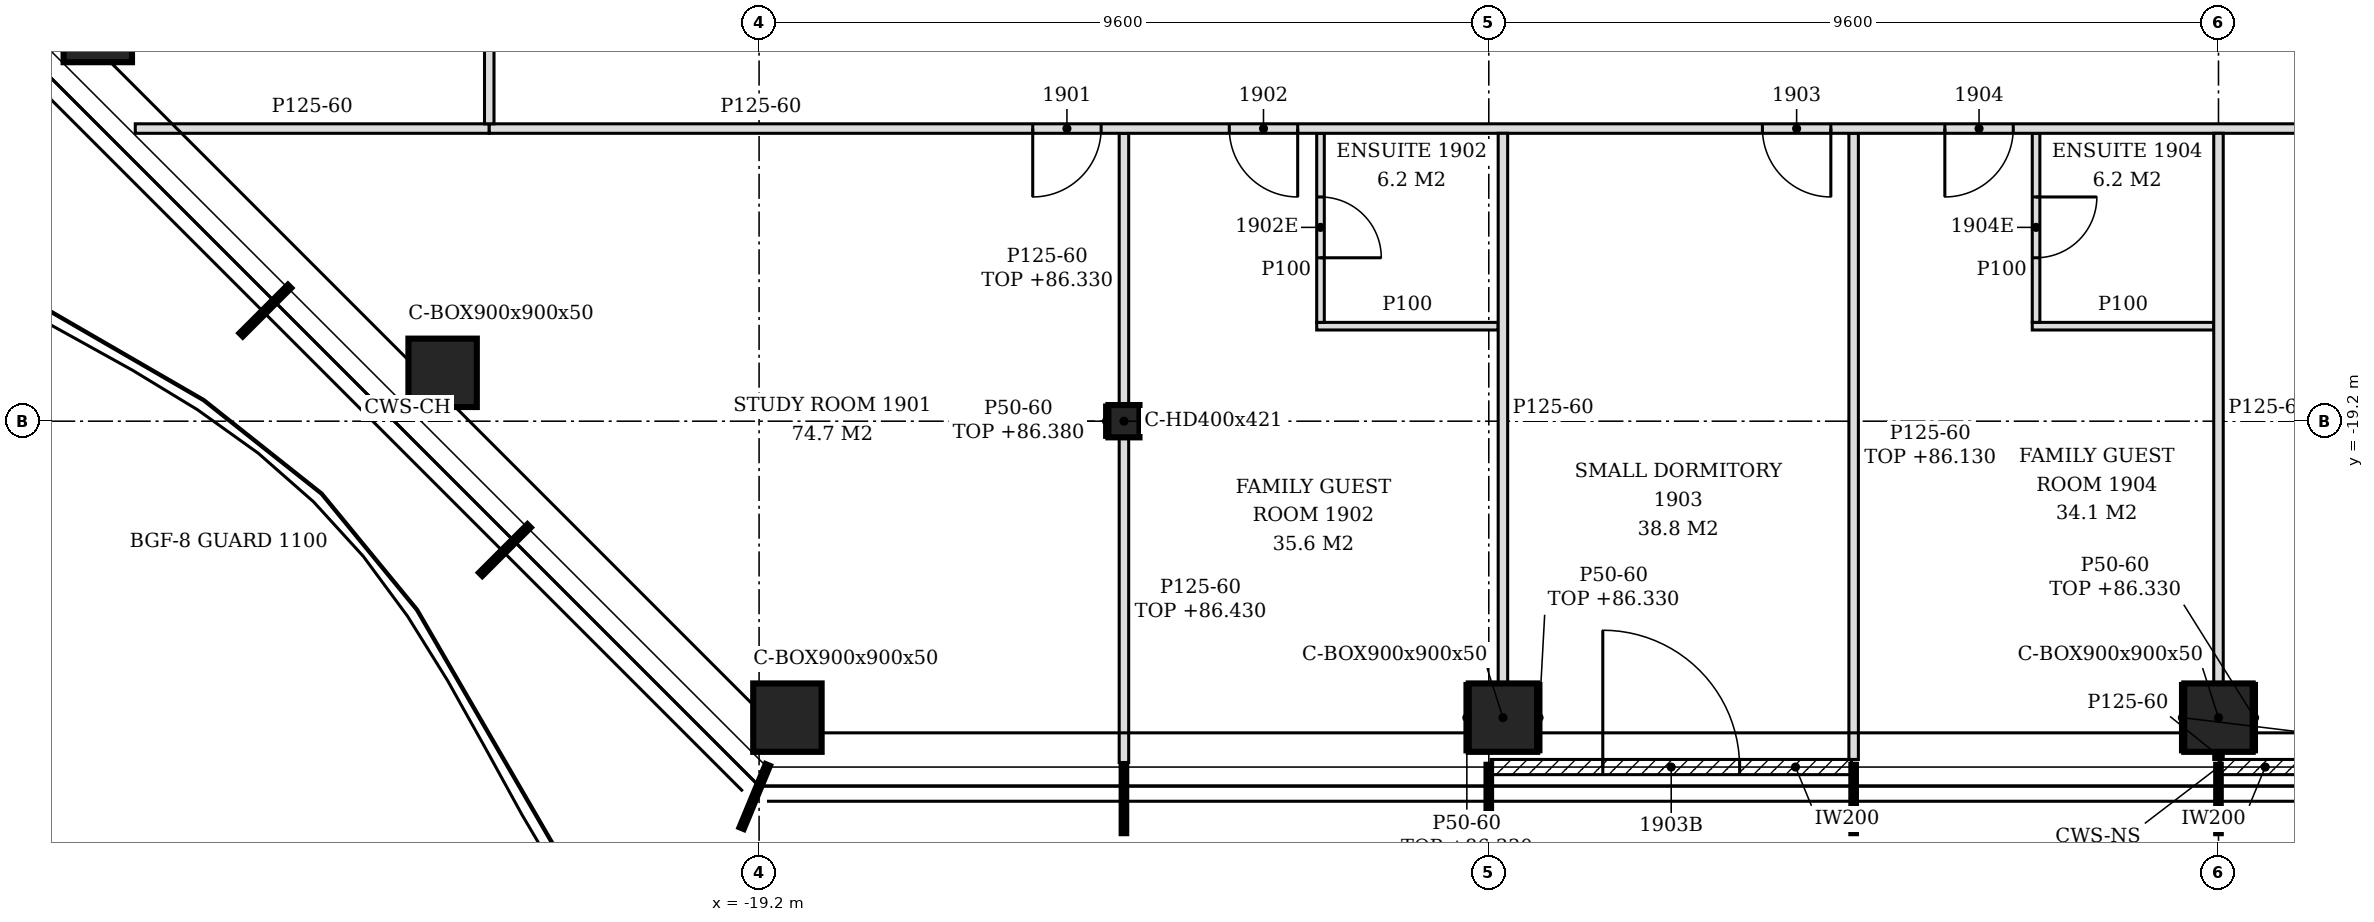
"""IFC4 building model, lengths in metres.
Left out: names, types, materials, properties, quantities, classifications, styles, units other than length and angle.
Written with IfcOpenShell. Run it as: python <this file> out.ifc"""

import sys

from ifc_helpers import new_model, si_unit, direction, frame, frame_2d, origin, origin_2d, place, context, subcontext, project, spatial, polyline, rectangle, hollow_rectangle, i_section, outline, extrude, clip, halfspace, element, fill, save


model = new_model("IFC4")
c1 = context("Model", 3, precision=1e-05, world=origin(), true_north=direction((0.0, 1.0)))
c2 = subcontext(c1, "Body", "Model", "MODEL_VIEW")
j1 = project(units=[si_unit("LENGTHUNIT", "METRE"), si_unit("PLANEANGLEUNIT", "RADIAN")], contexts=[c1])
p1 = place(None, origin())
s1 = spatial("IfcSite", under=j1, at=p1, CompositionType="ELEMENT")
p2 = place(p1, origin())
s2 = spatial("IfcBuilding", under=s1, at=p2, CompositionType="ELEMENT")
p3 = place(p2, frame((0.0, 0.0, 83.4)))
s3 = spatial("IfcBuildingStorey", under=s2, at=p3, CompositionType="ELEMENT", Elevation=83.4)
for number, where, z_axis, x_axis in (
    (1, (-18.827, -23.1, -0.15), (0.0, 0.0, 1.0), (1.0, 0.0, 0.0)),
    (2, (-9.414, -23.1, -0.15), (0.0, 0.0, 1.0), (1.0, 0.0, 0.0)),
    (3, (0.0, -23.1, -0.15), (0.0, 0.0, 1.0), (1.0, 0.0, 0.0)),
    (4, (-27.9, -14.027, -0.15), (0.0, 0.0, 1.0), (1.0, 0.0, 0.0)),
    (5, (-23.364, -18.564, -0.15), (0.0, 0.0, 1.0), (1.0, 0.0, 0.0)),
):
    element("IfcColumn", number, at=place(p3, frame(where, z_axis=z_axis, x_axis=x_axis)), inside=s3, PredefinedType="COLUMN", context=c2, shape_type="Clipping", body=[
        clip(extrude(hollow_rectangle(XDim=0.9, YDim=0.9, WallThickness=0.05, at=origin_2d()), origin(), (0.0, 0.0, 1.0), 3.6), halfspace(frame((0.0, 0.0, 3.576), z_axis=(0.0, 0.0, 1.0), x_axis=(1.0, 0.0, 0.0)), False)),
    ])
p4 = place(p3, frame((-14.4, -19.2, -0.15), z_axis=(0.0, 0.0, 1.0), x_axis=(1.0, 0.0, 0.0)))
e6 = element("IfcColumn", 6, at=p4, inside=s3, PredefinedType="COLUMN", context=c2, shape_type="SweptSolid", body=[
    extrude(i_section(OverallWidth=0.409, OverallDepth=0.425, WebThickness=0.033, FlangeThickness=0.052, FilletRadius=0.015, at=origin_2d()), origin(), (0.0, 0.0, 1.0), 3.6),
])
p5 = place(p3, frame((-9.57, -23.75, 0.0), z_axis=(0.0, 0.0, 1.0), x_axis=(1.0, 0.0, 0.0)))
e7 = element("IfcWall", 7, at=p5, inside=s3, PredefinedType="NOTDEFINED", context=c2, shape_type="SweptSolid", body=[
    extrude(rectangle(XDim=4.74, YDim=0.2, at=frame_2d((2.37, 0.0))), origin(), (0.0, 0.0, 1.0), 3.45),
])
p6 = place(p5, frame((1.47, 0.0, 0.0)))
e8 = element("IfcOpeningElement", 8, at=p6, cuts=e7, PredefinedType="OPENING", context=c2, shape_type="SweptSolid", body=[
    extrude(rectangle(XDim=1.8, YDim=2.4, at=frame_2d((0.9, 1.2))), frame((0.0, 0.11, 0.0), z_axis=(0.0, -1.0, 0.0), x_axis=(1.0, 0.0, 0.0)), (0.0, 0.0, 1.0), 0.22),
])
p7 = place(p3, frame((0.03, -23.75, 0.0), z_axis=(0.0, 0.0, 1.0), x_axis=(1.0, 0.0, 0.0)))
e9 = element("IfcWall", 9, at=p7, inside=s3, PredefinedType="NOTDEFINED", context=c2, shape_type="SweptSolid", body=[
    extrude(rectangle(XDim=4.74, YDim=0.2, at=frame_2d((2.37, 0.0))), origin(), (0.0, 0.0, 1.0), 3.45),
])
p8 = place(p7, frame((1.17, 0.0, 0.0)))
e10 = element("IfcOpeningElement", 10, at=p8, cuts=e9, PredefinedType="OPENING", context=c2, shape_type="SweptSolid", body=[
    extrude(rectangle(XDim=2.4, YDim=2.4, at=frame_2d((1.2, 1.2))), frame((0.0, 0.11, 0.0), z_axis=(0.0, -1.0, 0.0), x_axis=(1.0, 0.0, 0.0)), (0.0, 0.0, 1.0), 0.22),
])
p9 = place(p3, frame((-14.4, -23.69, 0.0), z_axis=(0.0, 0.0, 1.0), x_axis=(0.0, 1.0, 0.0)))
e11 = element("IfcWall", 11, at=p9, inside=s3, PredefinedType="PARTITIONING", context=c2, shape_type="SweptSolid", body=[
    extrude(outline(polyline([(0.0, 0.0), (4.277, 0.0), (4.278, 3.03), (0.74, 3.03), (0.738, 2.93), (0.44, 2.93), (0.438, 3.03), (0.0, 3.03), (0.0, 0.0)])), frame((0.0, 0.062, 0.0), z_axis=(0.0, -1.0, 0.0), x_axis=(1.0, 0.0, 0.0)), (0.0, 0.0, 1.0), 0.125),
])
p10 = place(p3, frame((-4.8, -23.65, 0.0), z_axis=(0.0, 0.0, 1.0), x_axis=(0.0, 1.0, 0.0)))
e12 = element("IfcWall", 12, at=p10, inside=s3, PredefinedType="PARTITIONING", context=c2, shape_type="SweptSolid", body=[
    extrude(rectangle(XDim=8.237, YDim=0.125, at=frame_2d((4.119, 0.0))), origin(), (0.0, 0.0, 1.0), 2.73),
])
p11 = place(p3, frame((0.0, -23.65, 0.0), z_axis=(0.0, 0.0, 1.0), x_axis=(0.0, 1.0, 0.0)))
e13 = element("IfcWall", 13, at=p11, inside=s3, PredefinedType="PARTITIONING", context=c2, shape_type="SweptSolid", body=[
    extrude(rectangle(XDim=0.1, YDim=0.125, at=frame_2d((0.05, 0.0))), origin(), (0.0, 0.0, 1.0), 3.45),
])
p12 = place(p3, frame((0.0, -22.65, 0.0), z_axis=(0.0, 0.0, 1.0), x_axis=(0.0, 1.0, 0.0)))
e14 = element("IfcWall", 14, at=p12, inside=s3, PredefinedType="PARTITIONING", context=c2, shape_type="SweptSolid", body=[
    extrude(outline(polyline([(0.0, 0.0), (7.237, 0.0), (7.238, 3.45), (3.555, 3.45), (3.553, 2.88), (3.345, 2.88), (3.343, 3.45), (0.0, 3.45), (0.0, 0.0)])), frame((0.0, 0.062, 0.0), z_axis=(0.0, -1.0, 0.0), x_axis=(1.0, 0.0, 0.0)), (0.0, 0.0, 1.0), 0.125),
])
p13 = place(p3, frame((-9.414, -22.65, 0.0), z_axis=(0.0, 0.0, 1.0), x_axis=(0.0, 1.0, 0.0)))
e15 = element("IfcWall", 15, at=p13, inside=s3, PredefinedType="PARTITIONING", context=c2, shape_type="SweptSolid", body=[
    extrude(outline(polyline([(0.0, 0.0), (7.237, 0.0), (7.238, 3.45), (3.55, 3.45), (3.548, 2.93), (3.35, 2.93), (3.348, 3.45), (0.0, 3.45), (0.0, 0.0)])), frame((0.0, 0.062, 0.0), z_axis=(0.0, -1.0, 0.0), x_axis=(1.0, 0.0, 0.0)), (0.0, 0.0, 1.0), 0.125),
])
p14 = place(p3, frame((-14.4, -18.988, 0.0), z_axis=(0.0, 0.0, 1.0), x_axis=(0.0, 1.0, 0.0)))
e16 = element("IfcWall", 16, at=p14, inside=s3, PredefinedType="PARTITIONING", context=c2, shape_type="SweptSolid", body=[
    extrude(rectangle(XDim=3.575, YDim=0.125, at=frame_2d((1.788, 0.0))), origin(), (0.0, 0.0, 1.0), 2.93),
])
p15 = place(p3, frame((-11.864, -17.95, 0.0), z_axis=(0.0, 0.0, 1.0), x_axis=(1.0, 0.0, 0.0)))
e17 = element("IfcWall", 17, at=p15, inside=s3, PredefinedType="PARTITIONING", context=c2, shape_type="SweptSolid", body=[
    extrude(rectangle(XDim=2.387, YDim=0.1, at=frame_2d((1.194, 0.0))), origin(), (0.0, 0.0, 1.0), 3.45),
])
p16 = place(p3, frame((-11.814, -17.9, 0.0), z_axis=(0.0, 0.0, 1.0), x_axis=(0.0, 1.0, 0.0)))
e18 = element("IfcWall", 18, at=p16, inside=s3, PredefinedType="PARTITIONING", context=c2, shape_type="SweptSolid", body=[
    extrude(rectangle(XDim=2.487, YDim=0.1, at=frame_2d((1.244, 0.0))), origin(), (0.0, 0.0, 1.0), 3.45),
])
p17 = place(p16, frame((0.85, 0.0, 0.0)))
e19 = element("IfcOpeningElement", 19, at=p17, cuts=e18, PredefinedType="OPENING", context=c2, shape_type="SweptSolid", body=[
    extrude(rectangle(XDim=0.8, YDim=2.1, at=frame_2d((0.4, 1.05))), frame((0.0, 0.06, 0.0), z_axis=(0.0, -1.0, 0.0), x_axis=(1.0, 0.0, 0.0)), (0.0, 0.0, 1.0), 0.12),
])
p18 = place(p3, frame((-2.45, -17.95, 0.0), z_axis=(0.0, 0.0, 1.0), x_axis=(1.0, 0.0, 0.0)))
e20 = element("IfcWall", 20, at=p18, inside=s3, PredefinedType="PARTITIONING", context=c2, shape_type="SweptSolid", body=[
    extrude(rectangle(XDim=2.387, YDim=0.1, at=frame_2d((1.194, 0.0))), origin(), (0.0, 0.0, 1.0), 3.45),
])
p19 = place(p3, frame((-2.4, -17.9, 0.0), z_axis=(0.0, 0.0, 1.0), x_axis=(0.0, 1.0, 0.0)))
e21 = element("IfcWall", 21, at=p19, inside=s3, PredefinedType="PARTITIONING", context=c2, shape_type="SweptSolid", body=[
    extrude(rectangle(XDim=2.487, YDim=0.1, at=frame_2d((1.244, 0.0))), origin(), (0.0, 0.0, 1.0), 3.45),
])
p20 = place(p19, frame((0.85, 0.0, 0.0)))
e22 = element("IfcOpeningElement", 22, at=p20, cuts=e21, PredefinedType="OPENING", context=c2, shape_type="SweptSolid", body=[
    extrude(rectangle(XDim=0.8, YDim=2.1, at=frame_2d((0.4, 1.05))), frame((0.0, 0.06, 0.0), z_axis=(0.0, -1.0, 0.0), x_axis=(1.0, 0.0, 0.0)), (0.0, 0.0, 1.0), 0.12),
])
p21 = place(p3, frame((-27.407, -15.35, 0.0), z_axis=(0.0, 0.0, 1.0), x_axis=(1.0, 0.0, 0.0)))
e23 = element("IfcWall", 23, at=p21, inside=s3, PredefinedType="PARTITIONING", context=c2, shape_type="SweptSolid", body=[
    extrude(outline(polyline([(0.0, 0.0), (4.657, 0.0), (4.657, 3.45), (1.104, 3.45), (1.102, 2.93), (0.555, 2.93), (0.553, 3.45), (0.0, 3.45), (0.0, 0.0)])), frame((0.0, 0.062, 0.0), z_axis=(0.0, -1.0, 0.0), x_axis=(1.0, 0.0, 0.0)), (0.0, 0.0, 1.0), 0.125),
])
p22 = place(p3, frame((-22.75, -15.35, 0.0), z_axis=(0.0, 0.0, 1.0), x_axis=(1.0, 0.0, 0.0)))
e24 = element("IfcWall", 24, at=p22, inside=s3, PredefinedType="PARTITIONING", context=c2, shape_type="SweptSolid", body=[
    extrude(outline(polyline([(0.0, 0.0), (41.887, 0.0), (41.887, 2.73), (41.8, 2.73), (41.798, 3.45), (30.1, 3.45), (30.098, 2.73), (29.8, 2.73), (29.798, 3.45), (18.1, 3.45), (18.098, 2.73), (17.8, 2.73), (17.798, 3.45), (8.5, 3.45), (8.498, 2.93), (8.2, 2.93), (8.198, 3.45), (0.0, 3.45), (0.0, 0.0)])), frame((0.0, 0.062, 0.0), z_axis=(0.0, -1.0, 0.0), x_axis=(1.0, 0.0, 0.0)), (0.0, 0.0, 1.0), 0.125),
])
p23 = place(p22, frame((7.15, 0.0, 0.0)))
e25 = element("IfcOpeningElement", 25, at=p23, cuts=e24, PredefinedType="OPENING", context=c2, shape_type="SweptSolid", body=[
    extrude(rectangle(XDim=0.9, YDim=2.1, at=frame_2d((0.45, 1.05))), frame((0.0, 0.073, 0.0), z_axis=(0.0, -1.0, 0.0), x_axis=(1.0, 0.0, 0.0)), (0.0, 0.0, 1.0), 0.145),
])
p24 = place(p22, frame((9.736, 0.0, 0.0)))
e26 = element("IfcOpeningElement", 26, at=p24, cuts=e24, PredefinedType="OPENING", context=c2, shape_type="SweptSolid", body=[
    extrude(rectangle(XDim=0.9, YDim=2.1, at=frame_2d((0.45, 1.05))), frame((0.0, 0.073, 0.0), z_axis=(0.0, -1.0, 0.0), x_axis=(1.0, 0.0, 0.0)), (0.0, 0.0, 1.0), 0.145),
])
p25 = place(p22, frame((16.75, 0.0, 0.0)))
e27 = element("IfcOpeningElement", 27, at=p25, cuts=e24, PredefinedType="OPENING", context=c2, shape_type="SweptSolid", body=[
    extrude(rectangle(XDim=0.9, YDim=2.1, at=frame_2d((0.45, 1.05))), frame((0.0, 0.073, 0.0), z_axis=(0.0, -1.0, 0.0), x_axis=(1.0, 0.0, 0.0)), (0.0, 0.0, 1.0), 0.145),
])
p26 = place(p22, frame((19.15, 0.0, 0.0)))
e28 = element("IfcOpeningElement", 28, at=p26, cuts=e24, PredefinedType="OPENING", context=c2, shape_type="SweptSolid", body=[
    extrude(rectangle(XDim=0.9, YDim=2.1, at=frame_2d((0.45, 1.05))), frame((0.0, 0.073, 0.0), z_axis=(0.0, -1.0, 0.0), x_axis=(1.0, 0.0, 0.0)), (0.0, 0.0, 1.0), 0.145),
])
p27 = place(p22, frame((23.95, 0.0, 0.0)))
e29 = element("IfcOpeningElement", 29, at=p27, cuts=e24, PredefinedType="OPENING", context=c2, shape_type="SweptSolid", body=[
    extrude(rectangle(XDim=0.9, YDim=2.1, at=frame_2d((0.45, 1.05))), frame((0.0, 0.073, 0.0), z_axis=(0.0, -1.0, 0.0), x_axis=(1.0, 0.0, 0.0)), (0.0, 0.0, 1.0), 0.145),
])
p28 = place(p22, frame((30.964, 0.0, 0.0)))
e30 = element("IfcOpeningElement", 30, at=p28, cuts=e24, PredefinedType="OPENING", context=c2, shape_type="SweptSolid", body=[
    extrude(rectangle(XDim=0.9, YDim=2.1, at=frame_2d((0.45, 1.05))), frame((0.0, 0.073, 0.0), z_axis=(0.0, -1.0, 0.0), x_axis=(1.0, 0.0, 0.0)), (0.0, 0.0, 1.0), 0.145),
])
p29 = place(p22, frame((34.95, 0.0, 0.0)))
e31 = element("IfcOpeningElement", 31, at=p29, cuts=e24, PredefinedType="OPENING", context=c2, shape_type="SweptSolid", body=[
    extrude(rectangle(XDim=0.9, YDim=2.1, at=frame_2d((0.45, 1.05))), frame((0.0, 0.073, 0.0), z_axis=(0.0, -1.0, 0.0), x_axis=(1.0, 0.0, 0.0)), (0.0, 0.0, 1.0), 0.145),
])
p30 = place(p22, frame((39.95, 0.0, 0.0)))
e32 = element("IfcOpeningElement", 32, at=p30, cuts=e24, PredefinedType="OPENING", context=c2, shape_type="SweptSolid", body=[
    extrude(rectangle(XDim=0.9, YDim=2.1, at=frame_2d((0.45, 1.05))), frame((0.0, 0.073, 0.0), z_axis=(0.0, -1.0, 0.0), x_axis=(1.0, 0.0, 0.0)), (0.0, 0.0, 1.0), 0.145),
])
p31 = place(p3, frame((-22.75, -15.288, 0.0), z_axis=(0.0, 0.0, 1.0), x_axis=(0.0, 1.0, 0.0)))
e33 = element("IfcWall", 33, at=p31, inside=s3, PredefinedType="PARTITIONING", context=c2, shape_type="SweptSolid", body=[
    extrude(outline(polyline([(0.0, 0.0), (35.276, 0.0), (35.276, 3.45), (35.022, 3.45), (35.02, 2.63), (33.907, 2.63), (33.905, 3.45), (29.798, 3.45), (29.795, 2.83), (29.577, 2.83), (29.575, 3.45), (24.998, 3.45), (24.996, 2.83), (24.778, 2.83), (24.775, 3.45), (20.198, 3.45), (20.196, 2.83), (19.978, 2.83), (19.976, 3.45), (15.397, 3.45), (15.396, 2.83), (15.177, 2.83), (15.176, 3.45), (10.597, 3.45), (10.595, 2.83), (10.377, 2.83), (10.375, 3.45), (5.798, 3.45), (5.795, 2.83), (5.577, 2.83), (5.575, 3.45), (0.998, 3.45), (0.996, 2.83), (0.778, 2.83), (0.775, 3.45), (0.0, 3.45), (0.0, 0.0)])), frame((0.0, 0.062, 0.0), z_axis=(0.0, -1.0, 0.0), x_axis=(1.0, 0.0, 0.0)), (0.0, 0.0, 1.0), 0.125),
])
p32 = place(p31, frame((6.637, 0.0, 0.0)))
e34 = element("IfcOpeningElement", 34, at=p32, cuts=e33, PredefinedType="OPENING", context=c2, shape_type="SweptSolid", body=[
    extrude(rectangle(XDim=1.0, YDim=2.1, at=frame_2d((0.5, 1.05))), frame((0.0, 0.073, 0.0), z_axis=(0.0, -1.0, 0.0), x_axis=(1.0, 0.0, 0.0)), (0.0, 0.0, 1.0), 0.145),
])
p33 = place(p31, frame((10.912, 0.0, 0.0)))
e35 = element("IfcOpeningElement", 35, at=p33, cuts=e33, PredefinedType="OPENING", context=c2, shape_type="SweptSolid", body=[
    extrude(rectangle(XDim=0.9, YDim=2.1, at=frame_2d((0.45, 1.05))), frame((0.0, 0.073, 0.0), z_axis=(0.0, -1.0, 0.0), x_axis=(1.0, 0.0, 0.0)), (0.0, 0.0, 1.0), 0.145),
])
p34 = place(p31, frame((16.488, 0.0, 0.0)))
e36 = element("IfcOpeningElement", 36, at=p34, cuts=e33, PredefinedType="OPENING", context=c2, shape_type="SweptSolid", body=[
    extrude(rectangle(XDim=0.9, YDim=2.1, at=frame_2d((0.45, 1.05))), frame((0.0, 0.073, 0.0), z_axis=(0.0, -1.0, 0.0), x_axis=(1.0, 0.0, 0.0)), (0.0, 0.0, 1.0), 0.145),
])
p35 = place(p31, frame((20.263, 0.0, 0.0)))
e37 = element("IfcOpeningElement", 37, at=p35, cuts=e33, PredefinedType="OPENING", context=c2, shape_type="SweptSolid", body=[
    extrude(rectangle(XDim=0.9, YDim=2.1, at=frame_2d((0.45, 1.05))), frame((0.0, 0.073, 0.0), z_axis=(0.0, -1.0, 0.0), x_axis=(1.0, 0.0, 0.0)), (0.0, 0.0, 1.0), 0.145),
])
p36 = place(p31, frame((26.387, 0.0, 0.0)))
e38 = element("IfcOpeningElement", 38, at=p36, cuts=e33, PredefinedType="OPENING", context=c2, shape_type="SweptSolid", body=[
    extrude(rectangle(XDim=0.9, YDim=2.1, at=frame_2d((0.45, 1.05))), frame((0.0, 0.073, 0.0), z_axis=(0.0, -1.0, 0.0), x_axis=(1.0, 0.0, 0.0)), (0.0, 0.0, 1.0), 0.145),
])
p37 = place(p31, frame((29.615, 0.0, 0.0)))
e39 = element("IfcOpeningElement", 39, at=p37, cuts=e33, PredefinedType="OPENING", context=c2, shape_type="SweptSolid", body=[
    extrude(rectangle(XDim=0.9, YDim=2.1, at=frame_2d((0.45, 1.05))), frame((0.0, 0.073, 0.0), z_axis=(0.0, -1.0, 0.0), x_axis=(1.0, 0.0, 0.0)), (0.0, 0.0, 1.0), 0.145),
])
p38 = place(p3, frame((-14.629, -19.413, 0.0), z_axis=(0.0, 0.0, 1.0), x_axis=(0.0, 1.0, 0.0)))
e40 = element("IfcWall", 40, at=p38, inside=s3, PredefinedType="PARTITIONING", context=c2, shape_type="SweptSolid", body=[
    extrude(rectangle(XDim=0.425, YDim=0.05, at=frame_2d((0.212, 0.0))), origin(), (0.0, 0.0, 1.0), 2.98),
])
for number, where, z_axis, x_axis in (
    (41, (-0.475, -23.55, 0.0), (0.0, 0.0, 1.0), (0.0, 1.0, 0.0)),
    (42, (0.475, -23.55, 0.0), (0.0, 0.0, 1.0), (0.0, 1.0, 0.0)),
    (43, (-9.889, -23.55, 0.0), (0.0, 0.0, 1.0), (0.0, 1.0, 0.0)),
    (44, (-8.939, -23.55, 0.0), (0.0, 0.0, 1.0), (0.0, 1.0, 0.0)),
):
    element("IfcWall", number, at=place(p3, frame(where, z_axis=z_axis, x_axis=x_axis)), inside=s3, PredefinedType="PARTITIONING", context=c2, shape_type="SweptSolid", body=[
        extrude(rectangle(XDim=0.9, YDim=0.05, at=frame_2d((0.45, 0.0))), origin(), (0.0, 0.0, 1.0), 2.93),
    ])
p39 = place(p6, origin())
e45 = element("IfcDoor", 45, at=p39, inside=s3, OperationType="SINGLE_SWING_LEFT", PredefinedType="DOOR", context=c2, shape_type="SweptSolid", body=[
    extrude(rectangle(XDim=1.8, YDim=2.4, at=frame_2d((0.9, 1.2))), frame((0.0, 0.025, 0.0), z_axis=(0.0, -1.0, 0.0), x_axis=(1.0, 0.0, 0.0)), (0.0, 0.0, 1.0), 0.05),
])
fill(e8, e45)
p40 = place(p23, frame((0.9, 0.0, 0.0), z_axis=(0.0, 0.0, 1.0), x_axis=(-1.0, 0.0, 0.0)))
e46 = element("IfcDoor", 46, at=p40, inside=s3, OperationType="SINGLE_SWING_RIGHT", PredefinedType="DOOR", context=c2, shape_type="SweptSolid", body=[
    extrude(rectangle(XDim=0.9, YDim=2.1, at=frame_2d((0.45, 1.05))), frame((0.0, 0.025, 0.0), z_axis=(0.0, -1.0, 0.0), x_axis=(1.0, 0.0, 0.0)), (0.0, 0.0, 1.0), 0.05),
])
fill(e25, e46)
p41 = place(p24, frame((0.9, 0.0, 0.0), z_axis=(0.0, 0.0, 1.0), x_axis=(-1.0, 0.0, 0.0)))
e47 = element("IfcDoor", 47, at=p41, inside=s3, OperationType="SINGLE_SWING_LEFT", PredefinedType="DOOR", context=c2, shape_type="SweptSolid", body=[
    extrude(rectangle(XDim=0.9, YDim=2.1, at=frame_2d((0.45, 1.05))), frame((0.0, 0.025, 0.0), z_axis=(0.0, -1.0, 0.0), x_axis=(1.0, 0.0, 0.0)), (0.0, 0.0, 1.0), 0.05),
])
fill(e26, e47)
p42 = place(p17, frame((0.8, 0.0, 0.0), z_axis=(0.0, 0.0, 1.0), x_axis=(-1.0, 0.0, 0.0)))
e48 = element("IfcDoor", 48, at=p42, inside=s3, OperationType="SINGLE_SWING_RIGHT", PredefinedType="DOOR", context=c2, shape_type="SweptSolid", body=[
    extrude(rectangle(XDim=0.8, YDim=2.1, at=frame_2d((0.4, 1.05))), frame((0.0, 0.025, 0.0), z_axis=(0.0, -1.0, 0.0), x_axis=(1.0, 0.0, 0.0)), (0.0, 0.0, 1.0), 0.05),
])
fill(e19, e48)
p43 = place(p25, frame((0.9, 0.0, 0.0), z_axis=(0.0, 0.0, 1.0), x_axis=(-1.0, 0.0, 0.0)))
e49 = element("IfcDoor", 49, at=p43, inside=s3, OperationType="SINGLE_SWING_LEFT", PredefinedType="DOOR", context=c2, shape_type="SweptSolid", body=[
    extrude(rectangle(XDim=0.9, YDim=2.1, at=frame_2d((0.45, 1.05))), frame((0.0, 0.025, 0.0), z_axis=(0.0, -1.0, 0.0), x_axis=(1.0, 0.0, 0.0)), (0.0, 0.0, 1.0), 0.05),
])
fill(e27, e49)
p44 = place(p26, frame((0.9, 0.0, 0.0), z_axis=(0.0, 0.0, 1.0), x_axis=(-1.0, 0.0, 0.0)))
e50 = element("IfcDoor", 50, at=p44, inside=s3, OperationType="SINGLE_SWING_RIGHT", PredefinedType="DOOR", context=c2, shape_type="SweptSolid", body=[
    extrude(rectangle(XDim=0.9, YDim=2.1, at=frame_2d((0.45, 1.05))), frame((0.0, 0.025, 0.0), z_axis=(0.0, -1.0, 0.0), x_axis=(1.0, 0.0, 0.0)), (0.0, 0.0, 1.0), 0.05),
])
fill(e28, e50)
p45 = place(p20, frame((0.8, 0.0, 0.0), z_axis=(0.0, 0.0, 1.0), x_axis=(-1.0, 0.0, 0.0)))
e51 = element("IfcDoor", 51, at=p45, inside=s3, OperationType="SINGLE_SWING_LEFT", PredefinedType="DOOR", context=c2, shape_type="SweptSolid", body=[
    extrude(rectangle(XDim=0.8, YDim=2.1, at=frame_2d((0.4, 1.05))), frame((0.0, 0.025, 0.0), z_axis=(0.0, -1.0, 0.0), x_axis=(1.0, 0.0, 0.0)), (0.0, 0.0, 1.0), 0.05),
])
fill(e22, e51)
save(model, sys.argv[1])
